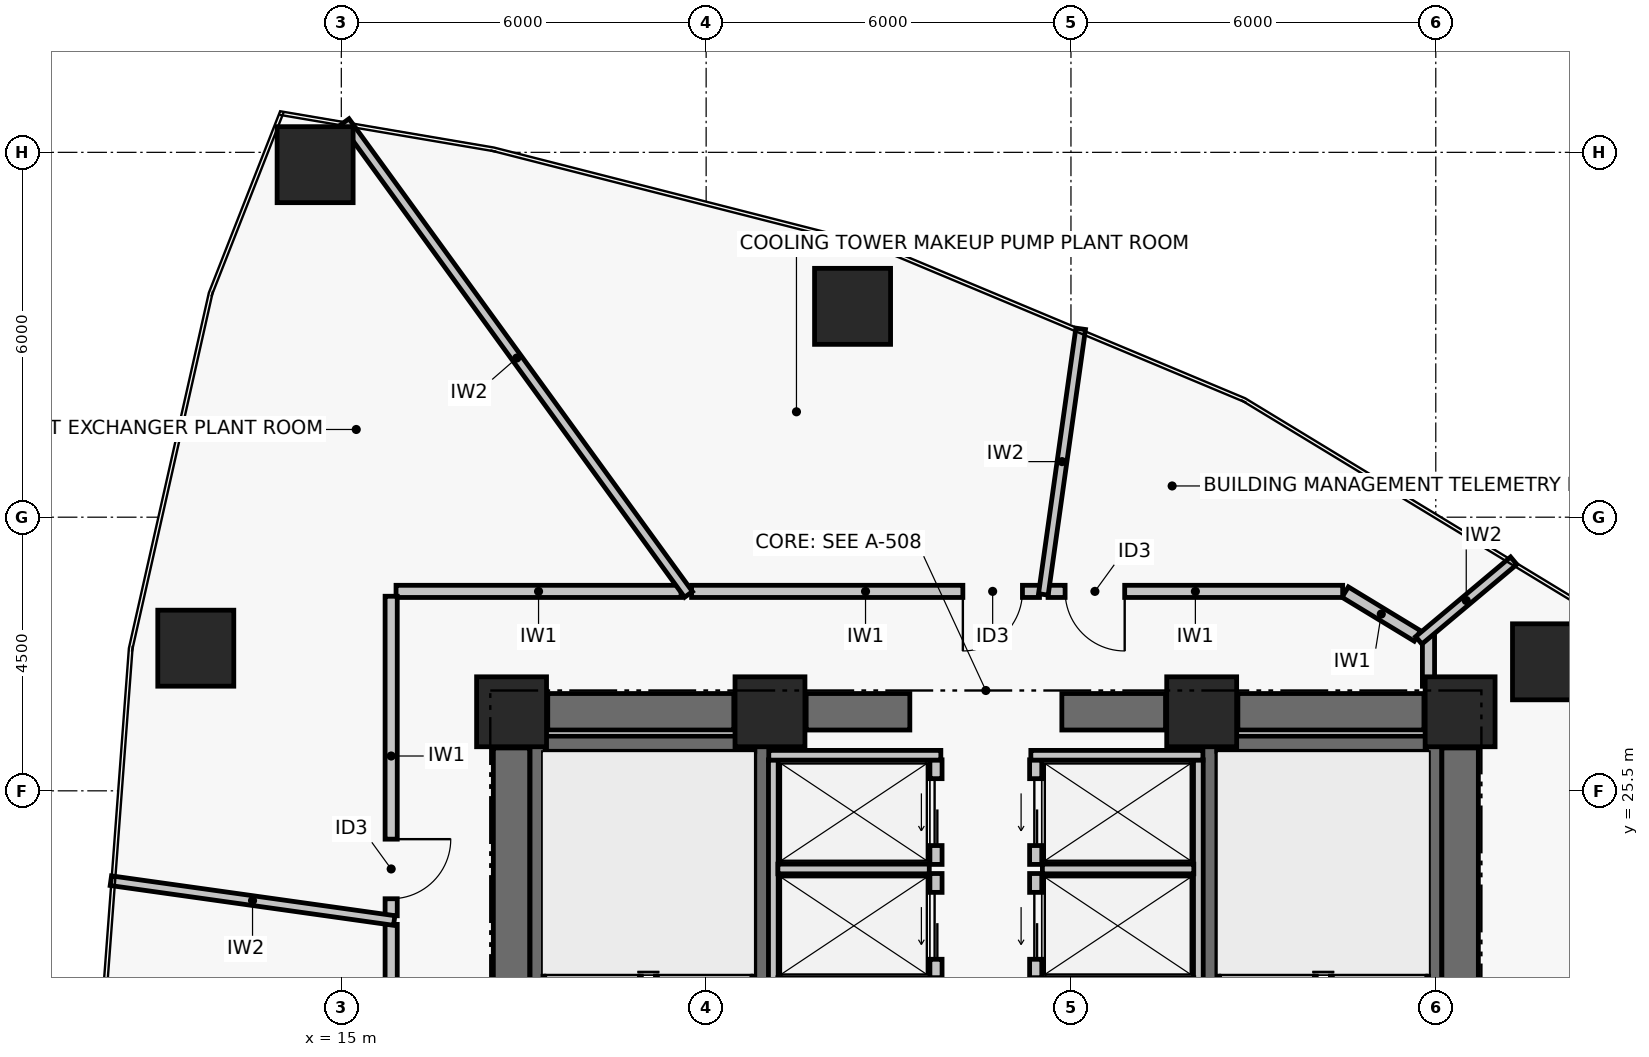
"""IFC4 building model, lengths in metres.
Left out: names, types, materials, properties, quantities, classifications, styles, units other than length and angle.
Written with IfcOpenShell. Run it as: python <this file> out.ifc"""

import sys

from ifc_helpers import new_model, si_unit, direction, frame, frame_2d, origin, origin_2d, place, context, subcontext, project, spatial, rectangle, hollow_rectangle, extrude, element, fill, save


model = new_model("IFC4")
c1 = context("Model", 3, precision=1e-05, world=origin(), true_north=direction((0.0, 1.0)))
c2 = subcontext(c1, "Body", "Model", "MODEL_VIEW")
j1 = project(units=[si_unit("LENGTHUNIT", "METRE"), si_unit("PLANEANGLEUNIT", "RADIAN")], contexts=[c1])
p1 = place(None, origin())
s1 = spatial("IfcSite", under=j1, at=p1, CompositionType="ELEMENT")
p2 = place(p1, origin())
s2 = spatial("IfcBuilding", under=s1, at=p2, CompositionType="ELEMENT")
p3 = place(p2, frame((0.0, 0.0, 83.4)))
s3 = spatial("IfcBuildingStorey", under=s2, at=p3, CompositionType="ELEMENT", Elevation=83.4)
for number, where, z_axis, x_axis in (
    (1, (17.8, 26.8, 0.0), (0.0, 0.0, 1.0), (1.0, 0.0, 0.0)),
    (2, (22.05, 26.8, 0.0), (0.0, 0.0, 1.0), (1.0, 0.0, 0.0)),
    (3, (29.15, 26.8, 0.0), (0.0, 0.0, 1.0), (1.0, 0.0, 0.0)),
    (4, (33.4, 26.8, 0.0), (0.0, 0.0, 1.0), (1.0, 0.0, 0.0)),
):
    element("IfcColumn", number, at=place(p3, frame(where, z_axis=z_axis, x_axis=x_axis)), inside=s3, PredefinedType="COLUMN", context=c2, shape_type="SweptSolid", body=[
        extrude(rectangle(XDim=1.15, YDim=1.15, at=origin_2d()), origin(), (0.0, 0.0, 1.0), 5.7),
    ])
p4 = place(p3, frame((18.395, 26.8, 0.0), z_axis=(0.0, 0.0, 1.0), x_axis=(1.0, 0.0, 0.0)))
e5 = element("IfcWall", 5, at=p4, inside=s3, PredefinedType="SHEAR", context=c2, shape_type="SweptSolid", body=[
    extrude(rectangle(XDim=3.06, YDim=0.6, at=frame_2d((1.53, 0.0))), origin(), (0.0, 0.0, 1.0), 5.45),
])
p5 = place(p3, frame((22.645, 26.8, 0.0), z_axis=(0.0, 0.0, 1.0), x_axis=(1.0, 0.0, 0.0)))
e6 = element("IfcWall", 6, at=p5, inside=s3, PredefinedType="SHEAR", context=c2, shape_type="SweptSolid", body=[
    extrude(rectangle(XDim=1.705, YDim=0.6, at=frame_2d((0.853, 0.0))), origin(), (0.0, 0.0, 1.0), 5.45),
])
p6 = place(p3, frame((26.85, 26.8, 0.0), z_axis=(0.0, 0.0, 1.0), x_axis=(1.0, 0.0, 0.0)))
e7 = element("IfcWall", 7, at=p6, inside=s3, PredefinedType="SHEAR", context=c2, shape_type="SweptSolid", body=[
    extrude(rectangle(XDim=1.705, YDim=0.6, at=frame_2d((0.853, 0.0))), origin(), (0.0, 0.0, 1.0), 5.45),
])
p7 = place(p3, frame((29.745, 26.8, 0.0), z_axis=(0.0, 0.0, 1.0), x_axis=(1.0, 0.0, 0.0)))
e8 = element("IfcWall", 8, at=p7, inside=s3, PredefinedType="SHEAR", context=c2, shape_type="SweptSolid", body=[
    extrude(rectangle(XDim=3.06, YDim=0.6, at=frame_2d((1.53, 0.0))), origin(), (0.0, 0.0, 1.0), 5.45),
])
for number, where, z_axis, x_axis in (
    (9, (17.8, 17.795, 0.0), (0.0, 0.0, 1.0), (0.0, 1.0, 0.0)),
    (10, (33.4, 17.795, 0.0), (0.0, 0.0, 1.0), (0.0, 1.0, 0.0)),
):
    element("IfcWall", number, at=place(p3, frame(where, z_axis=z_axis, x_axis=x_axis)), inside=s3, PredefinedType="SHEAR", context=c2, shape_type="SweptSolid", body=[
        extrude(rectangle(XDim=8.41, YDim=0.6, at=frame_2d((4.205, 0.0))), origin(), (0.0, 0.0, 1.0), 5.45),
    ])
p8 = place(p3, frame((18.229, 17.6, 0.0), z_axis=(0.0, 0.0, 1.0), x_axis=(0.0, 1.0, 0.0)))
e11 = element("IfcWall", 11, at=p8, inside=s3, PredefinedType="SHEAR", context=c2, shape_type="SweptSolid", body=[
    extrude(rectangle(XDim=8.8, YDim=0.25, at=frame_2d((4.4, 0.0))), origin(), (0.0, 0.0, 1.0), 5.45),
])
p9 = place(p3, frame((21.925, 17.6, 0.0), z_axis=(0.0, 0.0, 1.0), x_axis=(0.0, 1.0, 0.0)))
e12 = element("IfcWall", 12, at=p9, inside=s3, PredefinedType="SHEAR", context=c2, shape_type="SweptSolid", body=[
    extrude(rectangle(XDim=8.8, YDim=0.25, at=frame_2d((4.4, 0.0))), origin(), (0.0, 0.0, 1.0), 5.45),
])
p10 = place(p9, frame((0.35, 0.0, 0.0)))
e13 = element("IfcOpeningElement", 13, at=p10, cuts=e12, PredefinedType="OPENING", context=c2, shape_type="SweptSolid", body=[
    extrude(rectangle(XDim=1.05, YDim=2.08, at=frame_2d((0.525, 1.04))), frame((0.0, 0.135, 0.0), z_axis=(0.0, -1.0, 0.0), x_axis=(1.0, 0.0, 0.0)), (0.0, 0.0, 1.0), 0.27),
])
p11 = place(p3, frame((18.354, 26.275, 0.0), z_axis=(0.0, 0.0, 1.0), x_axis=(1.0, 0.0, 0.0)))
e14 = element("IfcWall", 14, at=p11, inside=s3, PredefinedType="SHEAR", context=c2, shape_type="SweptSolid", body=[
    extrude(rectangle(XDim=3.446, YDim=0.25, at=frame_2d((1.723, 0.0))), origin(), (0.0, 0.0, 1.0), 5.45),
])
p12 = place(p3, frame((29.275, 17.6, 0.0), z_axis=(0.0, 0.0, 1.0), x_axis=(0.0, 1.0, 0.0)))
e15 = element("IfcWall", 15, at=p12, inside=s3, PredefinedType="SHEAR", context=c2, shape_type="SweptSolid", body=[
    extrude(rectangle(XDim=8.8, YDim=0.25, at=frame_2d((4.4, 0.0))), origin(), (0.0, 0.0, 1.0), 5.45),
])
p13 = place(p12, frame((0.35, 0.0, 0.0)))
e16 = element("IfcOpeningElement", 16, at=p13, cuts=e15, PredefinedType="OPENING", context=c2, shape_type="SweptSolid", body=[
    extrude(rectangle(XDim=1.05, YDim=2.08, at=frame_2d((0.525, 1.04))), frame((0.0, 0.135, 0.0), z_axis=(0.0, -1.0, 0.0), x_axis=(1.0, 0.0, 0.0)), (0.0, 0.0, 1.0), 0.27),
])
p14 = place(p3, frame((32.971, 17.6, 0.0), z_axis=(0.0, 0.0, 1.0), x_axis=(0.0, 1.0, 0.0)))
e17 = element("IfcWall", 17, at=p14, inside=s3, PredefinedType="SHEAR", context=c2, shape_type="SweptSolid", body=[
    extrude(rectangle(XDim=8.8, YDim=0.25, at=frame_2d((4.4, 0.0))), origin(), (0.0, 0.0, 1.0), 5.45),
])
p15 = place(p3, frame((29.4, 26.275, 0.0), z_axis=(0.0, 0.0, 1.0), x_axis=(1.0, 0.0, 0.0)))
e18 = element("IfcWall", 18, at=p15, inside=s3, PredefinedType="SHEAR", context=c2, shape_type="SweptSolid", body=[
    extrude(rectangle(XDim=3.446, YDim=0.25, at=frame_2d((1.723, 0.0))), origin(), (0.0, 0.0, 1.0), 5.45),
])
for number, where, z_axis, x_axis in (
    (19, (34.887, 27.622, 0.0), (0.0, 0.0, 1.0), (1.0, 0.0, 0.0)),
    (20, (23.408, 33.467, 0.0), (0.0, 0.0, 1.0), (1.0, 0.0, 0.0)),
    (21, (14.569, 35.797, 0.0), (0.0, 0.0, 1.0), (1.0, 0.0, 0.0)),
    (22, (12.607, 27.846, 0.0), (0.0, 0.0, 1.0), (1.0, 0.0, 0.0)),
):
    element("IfcColumn", number, at=place(p3, frame(where, z_axis=z_axis, x_axis=x_axis)), inside=s3, PredefinedType="COLUMN", context=c2, shape_type="SweptSolid", body=[
        extrude(hollow_rectangle(XDim=1.25, YDim=1.25, WallThickness=0.05, at=origin_2d()), origin(), (0.0, 0.0, 1.0), 5.7),
    ])
p16 = place(p3, frame((24.78, 22.42, 0.0), z_axis=(0.0, 0.0, 1.0), x_axis=(0.0, 1.0, 0.0)))
e23 = element("IfcWall", 23, at=p16, inside=s3, PredefinedType="PARTITIONING", context=c2, shape_type="SweptSolid", body=[
    extrude(rectangle(XDim=1.72, YDim=0.2, at=frame_2d((0.86, 0.0))), origin(), (0.0, 0.0, 1.0), 5.45),
])
p17 = place(p16, frame((0.31, 0.0, 0.0)))
e24 = element("IfcOpeningElement", 24, at=p17, cuts=e23, PredefinedType="OPENING", context=c2, shape_type="SweptSolid", body=[
    extrude(rectangle(XDim=1.1, YDim=2.08, at=frame_2d((0.55, 1.04))), frame((0.0, 0.11, 0.0), z_axis=(0.0, -1.0, 0.0), x_axis=(1.0, 0.0, 0.0)), (0.0, 0.0, 1.0), 0.22),
])
p18 = place(p3, frame((24.78, 24.29, 0.0), z_axis=(0.0, 0.0, 1.0), x_axis=(0.0, 1.0, 0.0)))
e25 = element("IfcWall", 25, at=p18, inside=s3, PredefinedType="PARTITIONING", context=c2, shape_type="SweptSolid", body=[
    extrude(rectangle(XDim=1.72, YDim=0.2, at=frame_2d((0.86, 0.0))), origin(), (0.0, 0.0, 1.0), 5.45),
])
p19 = place(p18, frame((0.31, 0.0, 0.0)))
e26 = element("IfcOpeningElement", 26, at=p19, cuts=e25, PredefinedType="OPENING", context=c2, shape_type="SweptSolid", body=[
    extrude(rectangle(XDim=1.1, YDim=2.08, at=frame_2d((0.55, 1.04))), frame((0.0, 0.11, 0.0), z_axis=(0.0, -1.0, 0.0), x_axis=(1.0, 0.0, 0.0)), (0.0, 0.0, 1.0), 0.22),
])
p20 = place(p3, frame((26.42, 22.42, 0.0), z_axis=(0.0, 0.0, 1.0), x_axis=(0.0, 1.0, 0.0)))
e27 = element("IfcWall", 27, at=p20, inside=s3, PredefinedType="PARTITIONING", context=c2, shape_type="SweptSolid", body=[
    extrude(rectangle(XDim=1.72, YDim=0.2, at=frame_2d((0.86, 0.0))), origin(), (0.0, 0.0, 1.0), 5.45),
])
p21 = place(p20, frame((0.31, 0.0, 0.0)))
e28 = element("IfcOpeningElement", 28, at=p21, cuts=e27, PredefinedType="OPENING", context=c2, shape_type="SweptSolid", body=[
    extrude(rectangle(XDim=1.1, YDim=2.08, at=frame_2d((0.55, 1.04))), frame((0.0, 0.11, 0.0), z_axis=(0.0, -1.0, 0.0), x_axis=(1.0, 0.0, 0.0)), (0.0, 0.0, 1.0), 0.22),
])
p22 = place(p3, frame((26.42, 24.29, 0.0), z_axis=(0.0, 0.0, 1.0), x_axis=(0.0, 1.0, 0.0)))
e29 = element("IfcWall", 29, at=p22, inside=s3, PredefinedType="PARTITIONING", context=c2, shape_type="SweptSolid", body=[
    extrude(rectangle(XDim=1.72, YDim=0.2, at=frame_2d((0.86, 0.0))), origin(), (0.0, 0.0, 1.0), 5.45),
])
p23 = place(p22, frame((0.31, 0.0, 0.0)))
e30 = element("IfcOpeningElement", 30, at=p23, cuts=e29, PredefinedType="OPENING", context=c2, shape_type="SweptSolid", body=[
    extrude(rectangle(XDim=1.1, YDim=2.08, at=frame_2d((0.55, 1.04))), frame((0.0, 0.11, 0.0), z_axis=(0.0, -1.0, 0.0), x_axis=(1.0, 0.0, 0.0)), (0.0, 0.0, 1.0), 0.22),
])
p24 = place(p3, frame((22.105, 20.56, 0.0), z_axis=(0.0, 0.0, 1.0), x_axis=(0.0, 1.0, 0.0)))
e31 = element("IfcWall", 31, at=p24, inside=s3, PredefinedType="PARTITIONING", context=c2, shape_type="SweptSolid", body=[
    extrude(rectangle(XDim=5.45, YDim=0.16, at=frame_2d((2.725, 0.0))), origin(), (0.0, 0.0, 1.0), 5.45),
])
p25 = place(p3, frame((22.18, 24.215, 0.0), z_axis=(0.0, 0.0, 1.0), x_axis=(1.0, 0.0, 0.0)))
e32 = element("IfcWall", 32, at=p25, inside=s3, PredefinedType="PARTITIONING", context=c2, shape_type="SweptSolid", body=[
    extrude(rectangle(XDim=2.49, YDim=0.16, at=frame_2d((1.245, 0.0))), origin(), (0.0, 0.0, 1.0), 5.45),
])
p26 = place(p3, frame((22.03, 26.085, 0.0), z_axis=(0.0, 0.0, 1.0), x_axis=(1.0, 0.0, 0.0)))
e33 = element("IfcWall", 33, at=p26, inside=s3, PredefinedType="PARTITIONING", context=c2, shape_type="SweptSolid", body=[
    extrude(rectangle(XDim=2.83, YDim=0.16, at=frame_2d((1.415, 0.0))), origin(), (0.0, 0.0, 1.0), 5.45),
])
p27 = place(p3, frame((29.095, 20.56, 0.0), z_axis=(0.0, 0.0, 1.0), x_axis=(0.0, 1.0, 0.0)))
e34 = element("IfcWall", 34, at=p27, inside=s3, PredefinedType="PARTITIONING", context=c2, shape_type="SweptSolid", body=[
    extrude(rectangle(XDim=5.45, YDim=0.16, at=frame_2d((2.725, 0.0))), origin(), (0.0, 0.0, 1.0), 5.45),
])
p28 = place(p3, frame((26.53, 24.215, 0.0), z_axis=(0.0, 0.0, 1.0), x_axis=(1.0, 0.0, 0.0)))
e35 = element("IfcWall", 35, at=p28, inside=s3, PredefinedType="PARTITIONING", context=c2, shape_type="SweptSolid", body=[
    extrude(rectangle(XDim=2.49, YDim=0.16, at=frame_2d((1.245, 0.0))), origin(), (0.0, 0.0, 1.0), 5.45),
])
p29 = place(p3, frame((26.34, 26.085, 0.0), z_axis=(0.0, 0.0, 1.0), x_axis=(1.0, 0.0, 0.0)))
e36 = element("IfcWall", 36, at=p29, inside=s3, PredefinedType="PARTITIONING", context=c2, shape_type="SweptSolid", body=[
    extrude(rectangle(XDim=2.83, YDim=0.16, at=frame_2d((1.415, 0.0))), origin(), (0.0, 0.0, 1.0), 5.45),
])
p30 = place(p3, frame((15.82, 23.304, 0.0), z_axis=(0.0, 0.0, 1.0), x_axis=(0.0, -1.0, 0.0)))
e37 = element("IfcWall", 37, at=p30, inside=s3, PredefinedType="PARTITIONING", context=c2, shape_type="SweptSolid", body=[
    extrude(rectangle(XDim=8.004, YDim=0.2, at=frame_2d((4.002, 0.0))), origin(), (0.0, 0.0, 1.0), 4.03),
])
p31 = place(p30, frame((1.088, 0.0, 0.0)))
e38 = element("IfcOpeningElement", 38, at=p31, cuts=e37, PredefinedType="OPENING", context=c2, shape_type="SweptSolid", body=[
    extrude(rectangle(XDim=0.98, YDim=2.06, at=frame_2d((0.49, 1.03))), frame((0.0, 0.11, 0.0), z_axis=(0.0, -1.0, 0.0), x_axis=(1.0, 0.0, 0.0)), (0.0, 0.0, 1.0), 0.22),
])
p32 = place(p3, frame((33.74, 27.22, 0.0), z_axis=(0.0, 0.0, 1.0), x_axis=(-1.0, 0.0, 0.0)))
e39 = element("IfcWall", 39, at=p32, inside=s3, PredefinedType="PARTITIONING", context=c2, shape_type="SweptSolid", body=[
    extrude(rectangle(XDim=0.86, YDim=0.2, at=frame_2d((0.43, 0.0))), origin(), (0.0, 0.0, 1.0), 4.03),
])
p33 = place(p3, frame((32.88, 27.22, 0.0), z_axis=(0.0, 0.0, 1.0), x_axis=(0.0, 1.0, 0.0)))
e40 = element("IfcWall", 40, at=p33, inside=s3, PredefinedType="PARTITIONING", context=c2, shape_type="SweptSolid", body=[
    extrude(rectangle(XDim=0.889, YDim=0.2, at=frame_2d((0.444, 0.0))), origin(), (0.0, 0.0, 1.0), 4.58),
])
p34 = place(p3, frame((32.698, 28.047, 0.0), z_axis=(0.0, 0.0, 1.0), x_axis=(-0.854720690503, 0.519088182514, 0.0)))
e41 = element("IfcWall", 41, at=p34, inside=s3, PredefinedType="PARTITIONING", context=c2, shape_type="SweptSolid", body=[
    extrude(rectangle(XDim=1.389, YDim=0.2, at=frame_2d((0.695, 0.0))), origin(), (0.0, 0.0, 1.0), 4.98),
])
p35 = place(p3, frame((31.469, 28.78, 0.0), z_axis=(0.0, 0.0, 1.0), x_axis=(-1.0, 0.0, 0.0)))
e42 = element("IfcWall", 42, at=p35, inside=s3, PredefinedType="PARTITIONING", context=c2, shape_type="SweptSolid", body=[
    extrude(rectangle(XDim=4.845, YDim=0.2, at=frame_2d((2.422, 0.0))), origin(), (0.0, 0.0, 1.0), 4.98),
])
p36 = place(p35, frame((3.585, 0.0, 0.0)))
e43 = element("IfcOpeningElement", 43, at=p36, cuts=e42, PredefinedType="OPENING", context=c2, shape_type="SweptSolid", body=[
    extrude(rectangle(XDim=0.98, YDim=2.06, at=frame_2d((0.49, 1.03))), frame((0.0, 0.11, 0.0), z_axis=(0.0, -1.0, 0.0), x_axis=(1.0, 0.0, 0.0)), (0.0, 0.0, 1.0), 0.22),
])
p37 = place(p3, frame((26.482, 28.78, 0.0), z_axis=(0.0, 0.0, 1.0), x_axis=(-1.0, 0.0, 0.0)))
e44 = element("IfcWall", 44, at=p37, inside=s3, PredefinedType="PARTITIONING", context=c2, shape_type="SweptSolid", body=[
    extrude(rectangle(XDim=5.722, YDim=0.2, at=frame_2d((2.861, 0.0))), origin(), (0.0, 0.0, 1.0), 4.03),
])
p38 = place(p37, frame((0.28, 0.0, 0.0)))
e45 = element("IfcOpeningElement", 45, at=p38, cuts=e44, PredefinedType="OPENING", context=c2, shape_type="SweptSolid", body=[
    extrude(rectangle(XDim=0.98, YDim=2.06, at=frame_2d((0.49, 1.03))), frame((0.0, 0.11, 0.0), z_axis=(0.0, -1.0, 0.0), x_axis=(1.0, 0.0, 0.0)), (0.0, 0.0, 1.0), 0.22),
])
p39 = place(p3, frame((20.587, 28.78, 0.0), z_axis=(0.0, 0.0, 1.0), x_axis=(-1.0, 0.0, 0.0)))
e46 = element("IfcWall", 46, at=p39, inside=s3, PredefinedType="PARTITIONING", context=c2, shape_type="SweptSolid", body=[
    extrude(rectangle(XDim=4.688, YDim=0.2, at=frame_2d((2.344, 0.0))), origin(), (0.0, 0.0, 1.0), 4.03),
])
p40 = place(p3, frame((15.82, 28.7, 0.0), z_axis=(0.0, 0.0, 1.0), x_axis=(0.0, -1.0, 0.0)))
e47 = element("IfcWall", 47, at=p40, inside=s3, PredefinedType="PARTITIONING", context=c2, shape_type="SweptSolid", body=[
    extrude(rectangle(XDim=5.255, YDim=0.2, at=frame_2d((2.627, 0.0))), origin(), (0.0, 0.0, 1.0), 4.03),
])
p41 = place(p40, frame((3.995, 0.0, 0.0)))
e48 = element("IfcOpeningElement", 48, at=p41, cuts=e47, PredefinedType="OPENING", context=c2, shape_type="SweptSolid", body=[
    extrude(rectangle(XDim=0.98, YDim=2.06, at=frame_2d((0.49, 1.03))), frame((0.0, 0.11, 0.0), z_axis=(0.0, -1.0, 0.0), x_axis=(1.0, 0.0, 0.0)), (0.0, 0.0, 1.0), 0.22),
])
p42 = place(p3, frame((32.72, 27.975, 0.0), z_axis=(0.0, 0.0, 1.0), x_axis=(0.765997428747, 0.642843635073, 0.0)))
e49 = element("IfcWall", 49, at=p42, inside=s3, PredefinedType="PARTITIONING", context=c2, shape_type="SweptSolid", body=[
    extrude(rectangle(XDim=2.038, YDim=0.16, at=frame_2d((1.019, 0.0))), origin(), (0.0, 0.0, 1.0), 4.83),
])
p43 = place(p3, frame((26.546, 28.73, 0.0), z_axis=(0.0, 0.0, 1.0), x_axis=(0.139150517212, 0.990271242418, 0.0)))
e50 = element("IfcWall", 50, at=p43, inside=s3, PredefinedType="PARTITIONING", context=c2, shape_type="SweptSolid", body=[
    extrude(rectangle(XDim=4.411, YDim=0.16, at=frame_2d((2.206, 0.0))), origin(), (0.0, 0.0, 1.0), 4.83),
])
p44 = place(p3, frame((20.71, 28.73, 0.0), z_axis=(0.0, 0.0, 1.0), x_axis=(-0.587794008935, 0.80901063223, 0.0)))
e51 = element("IfcWall", 51, at=p44, inside=s3, PredefinedType="PARTITIONING", context=c2, shape_type="SweptSolid", body=[
    extrude(rectangle(XDim=9.61, YDim=0.16, at=frame_2d((4.805, 0.0))), origin(), (0.0, 0.0, 1.0), 4.83),
])
p45 = place(p3, frame((15.87, 23.367, 0.0), z_axis=(0.0, 0.0, 1.0), x_axis=(-0.990266524338, 0.139184089518, 0.0)))
e52 = element("IfcWall", 52, at=p45, inside=s3, PredefinedType="PARTITIONING", context=c2, shape_type="SweptSolid", body=[
    extrude(rectangle(XDim=4.706, YDim=0.16, at=frame_2d((2.353, 0.0))), origin(), (0.0, 0.0, 1.0), 4.83),
])
p46 = place(p17, origin())
e53 = element("IfcDoor", 53, at=p46, inside=s3, OperationType="DOUBLE_DOOR_SLIDING", PredefinedType="DOOR", context=c2, shape_type="SweptSolid", body=[
    extrude(rectangle(XDim=1.1, YDim=2.08, at=frame_2d((0.55, 1.04))), frame((0.0, 0.025, 0.0), z_axis=(0.0, -1.0, 0.0), x_axis=(1.0, 0.0, 0.0)), (0.0, 0.0, 1.0), 0.05),
])
fill(e24, e53)
p47 = place(p19, origin())
e54 = element("IfcDoor", 54, at=p47, inside=s3, OperationType="DOUBLE_DOOR_SLIDING", PredefinedType="DOOR", context=c2, shape_type="SweptSolid", body=[
    extrude(rectangle(XDim=1.1, YDim=2.08, at=frame_2d((0.55, 1.04))), frame((0.0, 0.025, 0.0), z_axis=(0.0, -1.0, 0.0), x_axis=(1.0, 0.0, 0.0)), (0.0, 0.0, 1.0), 0.05),
])
fill(e26, e54)
p48 = place(p21, origin())
e55 = element("IfcDoor", 55, at=p48, inside=s3, OperationType="DOUBLE_DOOR_SLIDING", PredefinedType="DOOR", context=c2, shape_type="SweptSolid", body=[
    extrude(rectangle(XDim=1.1, YDim=2.08, at=frame_2d((0.55, 1.04))), frame((0.0, 0.025, 0.0), z_axis=(0.0, -1.0, 0.0), x_axis=(1.0, 0.0, 0.0)), (0.0, 0.0, 1.0), 0.05),
])
fill(e28, e55)
p49 = place(p23, origin())
e56 = element("IfcDoor", 56, at=p49, inside=s3, OperationType="DOUBLE_DOOR_SLIDING", PredefinedType="DOOR", context=c2, shape_type="SweptSolid", body=[
    extrude(rectangle(XDim=1.1, YDim=2.08, at=frame_2d((0.55, 1.04))), frame((0.0, 0.025, 0.0), z_axis=(0.0, -1.0, 0.0), x_axis=(1.0, 0.0, 0.0)), (0.0, 0.0, 1.0), 0.05),
])
fill(e30, e56)
p50 = place(p36, origin())
e57 = element("IfcDoor", 57, at=p50, inside=s3, OperationType="SINGLE_SWING_LEFT", PredefinedType="DOOR", context=c2, shape_type="SweptSolid", body=[
    extrude(rectangle(XDim=0.98, YDim=2.06, at=frame_2d((0.49, 1.03))), frame((0.0, 0.025, 0.0), z_axis=(0.0, -1.0, 0.0), x_axis=(1.0, 0.0, 0.0)), (0.0, 0.0, 1.0), 0.05),
])
fill(e43, e57)
p51 = place(p38, origin())
e58 = element("IfcDoor", 58, at=p51, inside=s3, OperationType="SINGLE_SWING_RIGHT", PredefinedType="DOOR", context=c2, shape_type="SweptSolid", body=[
    extrude(rectangle(XDim=0.98, YDim=2.06, at=frame_2d((0.49, 1.03))), frame((0.0, 0.025, 0.0), z_axis=(0.0, -1.0, 0.0), x_axis=(1.0, 0.0, 0.0)), (0.0, 0.0, 1.0), 0.05),
])
fill(e45, e58)
p52 = place(p41, origin())
e59 = element("IfcDoor", 59, at=p52, inside=s3, OperationType="SINGLE_SWING_LEFT", PredefinedType="DOOR", context=c2, shape_type="SweptSolid", body=[
    extrude(rectangle(XDim=0.98, YDim=2.06, at=frame_2d((0.49, 1.03))), frame((0.0, 0.025, 0.0), z_axis=(0.0, -1.0, 0.0), x_axis=(1.0, 0.0, 0.0)), (0.0, 0.0, 1.0), 0.05),
])
fill(e48, e59)
save(model, sys.argv[1])
